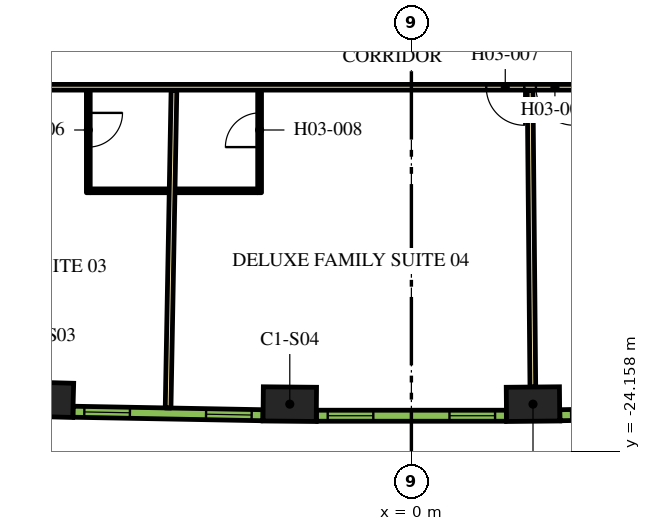
"""IFC4 building model, lengths in metres.
Left out: names, types, materials, properties, quantities, classifications, styles, units other than length and angle.
Written with IfcOpenShell. Run it as: python <this file> out.ifc"""

import sys

from ifc_helpers import new_model, si_unit, direction, frame, frame_2d, origin, origin_2d, place, context, subcontext, project, spatial, rectangle, extrude, element, fill, save


model = new_model("IFC4")
c1 = context("Model", 3, precision=1e-05, world=origin(), true_north=direction((0.0, 1.0)))
c2 = subcontext(c1, "Body", "Model", "MODEL_VIEW")
j1 = project(units=[si_unit("LENGTHUNIT", "METRE"), si_unit("PLANEANGLEUNIT", "RADIAN")], contexts=[c1])
p1 = place(None, origin())
s1 = spatial("IfcSite", under=j1, at=p1, CompositionType="ELEMENT")
p2 = place(p1, origin())
s2 = spatial("IfcBuilding", under=s1, at=p2, CompositionType="ELEMENT")
p3 = place(p2, frame((0.0, 0.0, 58.8)))
s3 = spatial("IfcBuildingStorey", under=s2, at=p3, CompositionType="ELEMENT", Elevation=58.8)
for number, where, z_axis, x_axis in (
    (1, (-9.599, -22.795, 0.0), (0.0, 0.0, 1.0), (1.0, -0.028, 0.0)),
    (2, (-3.2, -22.913, 0.0), (0.0, 0.0, 1.0), (1.0, -0.009, 0.0)),
    (3, (3.2, -22.913, 0.0), (0.0, 0.0, 1.0), (1.0, 0.009, 0.0)),
):
    element("IfcColumn", number, at=place(p3, frame(where, z_axis=z_axis, x_axis=x_axis)), inside=s3, PredefinedType="COLUMN", context=c2, shape_type="SweptSolid", body=[
        extrude(rectangle(XDim=1.4, YDim=0.9, at=origin_2d()), origin(), (0.0, 0.0, 1.0), 3.9),
    ])
p4 = place(p3, frame((12.918, -14.575, 0.0), z_axis=(0.0, 0.0, 1.0), x_axis=(-1.0, 0.0, 0.0)))
e4 = element("IfcWall", 4, at=p4, inside=s3, PredefinedType="PARTITIONING", context=c2, shape_type="SweptSolid", body=[
    extrude(rectangle(XDim=25.766, YDim=0.15, at=frame_2d((12.883, 0.0))), origin(), (0.0, 0.0, 1.0), 2.75),
])
p5 = place(p4, frame((24.586, 0.0, 0.0)))
e5 = element("IfcOpeningElement", 5, at=p5, cuts=e4, PredefinedType="OPENING", context=c2, shape_type="SweptSolid", body=[
    extrude(rectangle(XDim=1.0, YDim=2.1, at=frame_2d((0.5, 1.05))), frame((0.0, 0.085, 0.0), z_axis=(0.0, -1.0, 0.0), x_axis=(1.0, 0.0, 0.0)), (0.0, 0.0, 1.0), 0.17),
])
p6 = place(p4, frame((9.948, 0.0, 0.0)))
e6 = element("IfcOpeningElement", 6, at=p6, cuts=e4, PredefinedType="OPENING", context=c2, shape_type="SweptSolid", body=[
    extrude(rectangle(XDim=1.0, YDim=2.1, at=frame_2d((0.5, 1.05))), frame((0.0, 0.085, 0.0), z_axis=(0.0, -1.0, 0.0), x_axis=(1.0, 0.0, 0.0)), (0.0, 0.0, 1.0), 0.17),
])
p7 = place(p4, frame((8.642, 0.0, 0.0)))
e7 = element("IfcOpeningElement", 7, at=p7, cuts=e4, PredefinedType="OPENING", context=c2, shape_type="SweptSolid", body=[
    extrude(rectangle(XDim=1.0, YDim=2.1, at=frame_2d((0.5, 1.05))), frame((0.0, 0.085, 0.0), z_axis=(0.0, -1.0, 0.0), x_axis=(1.0, 0.0, 0.0)), (0.0, 0.0, 1.0), 0.17),
])
p8 = place(p4, frame((0.18, 0.0, 0.0)))
e8 = element("IfcOpeningElement", 8, at=p8, cuts=e4, PredefinedType="OPENING", context=c2, shape_type="SweptSolid", body=[
    extrude(rectangle(XDim=1.0, YDim=2.1, at=frame_2d((0.5, 1.05))), frame((0.0, 0.085, 0.0), z_axis=(0.0, -1.0, 0.0), x_axis=(1.0, 0.0, 0.0)), (0.0, 0.0, 1.0), 0.17),
])
p9 = place(p3, frame((-6.402, -23.014, 0.0), z_axis=(0.0, 0.0, 1.0), x_axis=(0.01849587109, 0.999828936745, 0.0)))
e9 = element("IfcWall", 9, at=p9, inside=s3, PredefinedType="PARTITIONING", context=c2, shape_type="SweptSolid", body=[
    extrude(rectangle(XDim=8.355, YDim=0.15, at=frame_2d((4.178, 0.0))), origin(), (0.0, 0.0, 1.0), 2.75),
])
p10 = place(p3, frame((3.196, -22.463, 0.0), z_axis=(0.0, 0.0, 1.0), x_axis=(-0.00926060032, 0.999957119721, 0.0)))
e10 = element("IfcWall", 10, at=p10, inside=s3, PredefinedType="PARTITIONING", context=c2, shape_type="SweptSolid", body=[
    extrude(rectangle(XDim=7.803, YDim=0.15, at=frame_2d((3.902, 0.0))), origin(), (0.0, 0.0, 1.0), 2.75),
])
p11 = place(p3, frame((-8.502, -14.65, 0.0), z_axis=(0.0, 0.0, 1.0), x_axis=(0.0, -1.0, 0.0)))
e11 = element("IfcWall", 11, at=p11, inside=s3, PredefinedType="PARTITIONING", context=c2, shape_type="SweptSolid", body=[
    extrude(rectangle(XDim=2.7, YDim=0.1, at=frame_2d((1.35, 0.0))), origin(), (0.0, 0.0, 1.0), 2.75),
])
p12 = place(p11, frame((0.6, 0.0, 0.0)))
e12 = element("IfcOpeningElement", 12, at=p12, cuts=e11, PredefinedType="OPENING", context=c2, shape_type="SweptSolid", body=[
    extrude(rectangle(XDim=0.9, YDim=2.1, at=frame_2d((0.45, 1.05))), frame((0.0, 0.06, 0.0), z_axis=(0.0, -1.0, 0.0), x_axis=(1.0, 0.0, 0.0)), (0.0, 0.0, 1.0), 0.12),
])
p13 = place(p3, frame((-8.452, -17.3, 0.0), z_axis=(0.0, 0.0, 1.0), x_axis=(1.0, 0.0, 0.0)))
e13 = element("IfcWall", 13, at=p13, inside=s3, PredefinedType="PARTITIONING", context=c2, shape_type="SweptSolid", body=[
    extrude(rectangle(XDim=2.07, YDim=0.1, at=frame_2d((1.035, 0.0))), origin(), (0.0, 0.0, 1.0), 2.75),
])
p14 = place(p3, frame((-3.994, -17.35, 0.0), z_axis=(0.0, 0.0, 1.0), x_axis=(0.0, 1.0, 0.0)))
e14 = element("IfcWall", 14, at=p14, inside=s3, PredefinedType="PARTITIONING", context=c2, shape_type="SweptSolid", body=[
    extrude(rectangle(XDim=2.7, YDim=0.1, at=frame_2d((1.35, 0.0))), origin(), (0.0, 0.0, 1.0), 2.75),
])
p15 = place(p14, frame((1.2, 0.0, 0.0)))
e15 = element("IfcOpeningElement", 15, at=p15, cuts=e14, PredefinedType="OPENING", context=c2, shape_type="SweptSolid", body=[
    extrude(rectangle(XDim=0.9, YDim=2.1, at=frame_2d((0.45, 1.05))), frame((0.0, 0.06, 0.0), z_axis=(0.0, -1.0, 0.0), x_axis=(1.0, 0.0, 0.0)), (0.0, 0.0, 1.0), 0.12),
])
p16 = place(p3, frame((-4.044, -17.3, 0.0), z_axis=(0.0, 0.0, 1.0), x_axis=(-1.0, 0.0, 0.0)))
e16 = element("IfcWall", 16, at=p16, inside=s3, PredefinedType="PARTITIONING", context=c2, shape_type="SweptSolid", body=[
    extrude(rectangle(XDim=2.17, YDim=0.1, at=frame_2d((1.085, 0.0))), origin(), (0.0, 0.0, 1.0), 2.75),
])
p17 = place(p3, frame((-8.904, -23.113, 0.0), z_axis=(0.0, 0.0, 1.0), x_axis=(0.999829529479, -0.018463801951, 0.0)))
e17 = element("IfcWall", 17, at=p17, inside=s3, PredefinedType="SOLIDWALL", context=c2, shape_type="SweptSolid", body=[
    extrude(rectangle(XDim=4.998, YDim=0.29, at=frame_2d((2.499, 0.0))), origin(), (0.0, 0.0, 1.0), 3.65),
])
p18 = place(p17, frame((0.297, 0.0, 0.9)))
e18 = element("IfcOpeningElement", 18, at=p18, cuts=e17, PredefinedType="OPENING", context=c2, shape_type="SweptSolid", body=[
    extrude(rectangle(XDim=1.2, YDim=2.15, at=frame_2d((0.6, 1.075))), frame((0.0, 0.155, 0.0), z_axis=(0.0, -1.0, 0.0), x_axis=(1.0, 0.0, 0.0)), (0.0, 0.0, 1.0), 0.31),
])
p19 = place(p17, frame((3.501, 0.0, 0.9)))
e19 = element("IfcOpeningElement", 19, at=p19, cuts=e17, PredefinedType="OPENING", context=c2, shape_type="SweptSolid", body=[
    extrude(rectangle(XDim=1.2, YDim=2.15, at=frame_2d((0.6, 1.075))), frame((0.0, 0.155, 0.0), z_axis=(0.0, -1.0, 0.0), x_axis=(1.0, 0.0, 0.0)), (0.0, 0.0, 1.0), 0.31),
])
p20 = place(p3, frame((-2.499, -23.218, 0.0), z_axis=(0.0, 0.0, 1.0), x_axis=(1.0, 0.0, 0.0)))
e20 = element("IfcWall", 20, at=p20, inside=s3, PredefinedType="SOLIDWALL", context=c2, shape_type="SweptSolid", body=[
    extrude(rectangle(XDim=4.998, YDim=0.29, at=frame_2d((2.499, 0.0))), origin(), (0.0, 0.0, 1.0), 3.65),
])
p21 = place(p20, frame((0.297, 0.0, 0.9)))
e21 = element("IfcOpeningElement", 21, at=p21, cuts=e20, PredefinedType="OPENING", context=c2, shape_type="SweptSolid", body=[
    extrude(rectangle(XDim=1.2, YDim=2.15, at=frame_2d((0.6, 1.075))), frame((0.0, 0.155, 0.0), z_axis=(0.0, -1.0, 0.0), x_axis=(1.0, 0.0, 0.0)), (0.0, 0.0, 1.0), 0.31),
])
p22 = place(p20, frame((3.501, 0.0, 0.9)))
e22 = element("IfcOpeningElement", 22, at=p22, cuts=e20, PredefinedType="OPENING", context=c2, shape_type="SweptSolid", body=[
    extrude(rectangle(XDim=1.2, YDim=2.15, at=frame_2d((0.6, 1.075))), frame((0.0, 0.155, 0.0), z_axis=(0.0, -1.0, 0.0), x_axis=(1.0, 0.0, 0.0)), (0.0, 0.0, 1.0), 0.31),
])
p23 = place(p3, frame((3.906, -23.205, 0.0), z_axis=(0.0, 0.0, 1.0), x_axis=(0.999829529479, 0.018463801951, 0.0)))
e23 = element("IfcWall", 23, at=p23, inside=s3, PredefinedType="SOLIDWALL", context=c2, shape_type="SweptSolid", body=[
    extrude(rectangle(XDim=4.998, YDim=0.29, at=frame_2d((2.499, 0.0))), origin(), (0.0, 0.0, 1.0), 3.65),
])
p24 = place(p23, frame((0.297, 0.0, 0.9)))
e24 = element("IfcOpeningElement", 24, at=p24, cuts=e23, PredefinedType="OPENING", context=c2, shape_type="SweptSolid", body=[
    extrude(rectangle(XDim=1.2, YDim=2.15, at=frame_2d((0.6, 1.075))), frame((0.0, 0.155, 0.0), z_axis=(0.0, -1.0, 0.0), x_axis=(1.0, 0.0, 0.0)), (0.0, 0.0, 1.0), 0.31),
])
p25 = place(p23, frame((3.501, 0.0, 0.9)))
e25 = element("IfcOpeningElement", 25, at=p25, cuts=e23, PredefinedType="OPENING", context=c2, shape_type="SweptSolid", body=[
    extrude(rectangle(XDim=1.2, YDim=2.15, at=frame_2d((0.6, 1.075))), frame((0.0, 0.155, 0.0), z_axis=(0.0, -1.0, 0.0), x_axis=(1.0, 0.0, 0.0)), (0.0, 0.0, 1.0), 0.31),
])
p26 = place(p12, origin())
e26 = element("IfcDoor", 26, at=p26, inside=s3, OperationType="SINGLE_SWING_RIGHT", PredefinedType="DOOR", context=c2, shape_type="SweptSolid", body=[
    extrude(rectangle(XDim=0.9, YDim=2.1, at=frame_2d((0.45, 1.05))), frame((0.0, 0.025, 0.0), z_axis=(0.0, -1.0, 0.0), x_axis=(1.0, 0.0, 0.0)), (0.0, 0.0, 1.0), 0.05),
])
fill(e12, e26)
p27 = place(p6, origin())
e27 = element("IfcDoor", 27, at=p27, inside=s3, OperationType="SINGLE_SWING_LEFT", PredefinedType="DOOR", context=c2, shape_type="SweptSolid", body=[
    extrude(rectangle(XDim=1.0, YDim=2.1, at=frame_2d((0.5, 1.05))), frame((0.0, 0.025, 0.0), z_axis=(0.0, -1.0, 0.0), x_axis=(1.0, 0.0, 0.0)), (0.0, 0.0, 1.0), 0.05),
])
fill(e6, e27)
p28 = place(p15, origin())
e28 = element("IfcDoor", 28, at=p28, inside=s3, OperationType="SINGLE_SWING_LEFT", PredefinedType="DOOR", context=c2, shape_type="SweptSolid", body=[
    extrude(rectangle(XDim=0.9, YDim=2.1, at=frame_2d((0.45, 1.05))), frame((0.0, 0.025, 0.0), z_axis=(0.0, -1.0, 0.0), x_axis=(1.0, 0.0, 0.0)), (0.0, 0.0, 1.0), 0.05),
])
fill(e15, e28)
p29 = place(p7, origin())
e29 = element("IfcDoor", 29, at=p29, inside=s3, OperationType="SINGLE_SWING_RIGHT", PredefinedType="DOOR", context=c2, shape_type="SweptSolid", body=[
    extrude(rectangle(XDim=1.0, YDim=2.1, at=frame_2d((0.5, 1.05))), frame((0.0, 0.025, 0.0), z_axis=(0.0, -1.0, 0.0), x_axis=(1.0, 0.0, 0.0)), (0.0, 0.0, 1.0), 0.05),
])
fill(e7, e29)
p30 = place(p18, origin())
e30 = element("IfcWindow", 30, at=p30, inside=s3, PartitioningType="DOUBLE_PANEL_VERTICAL", PredefinedType="WINDOW", context=c2, shape_type="SweptSolid", body=[
    extrude(rectangle(XDim=1.2, YDim=2.15, at=frame_2d((0.6, 1.075))), frame((0.0, 0.015, 0.0), z_axis=(0.0, -1.0, 0.0), x_axis=(1.0, 0.0, 0.0)), (0.0, 0.0, 1.0), 0.06),
])
fill(e18, e30)
p31 = place(p19, origin())
e31 = element("IfcWindow", 31, at=p31, inside=s3, PartitioningType="DOUBLE_PANEL_VERTICAL", PredefinedType="WINDOW", context=c2, shape_type="SweptSolid", body=[
    extrude(rectangle(XDim=1.2, YDim=2.15, at=frame_2d((0.6, 1.075))), frame((0.0, 0.015, 0.0), z_axis=(0.0, -1.0, 0.0), x_axis=(1.0, 0.0, 0.0)), (0.0, 0.0, 1.0), 0.06),
])
fill(e19, e31)
p32 = place(p21, origin())
e32 = element("IfcWindow", 32, at=p32, inside=s3, PartitioningType="DOUBLE_PANEL_VERTICAL", PredefinedType="WINDOW", context=c2, shape_type="SweptSolid", body=[
    extrude(rectangle(XDim=1.2, YDim=2.15, at=frame_2d((0.6, 1.075))), frame((0.0, 0.015, 0.0), z_axis=(0.0, -1.0, 0.0), x_axis=(1.0, 0.0, 0.0)), (0.0, 0.0, 1.0), 0.06),
])
fill(e21, e32)
p33 = place(p22, origin())
e33 = element("IfcWindow", 33, at=p33, inside=s3, PartitioningType="DOUBLE_PANEL_VERTICAL", PredefinedType="WINDOW", context=c2, shape_type="SweptSolid", body=[
    extrude(rectangle(XDim=1.2, YDim=2.15, at=frame_2d((0.6, 1.075))), frame((0.0, 0.015, 0.0), z_axis=(0.0, -1.0, 0.0), x_axis=(1.0, 0.0, 0.0)), (0.0, 0.0, 1.0), 0.06),
])
fill(e22, e33)
save(model, sys.argv[1])
